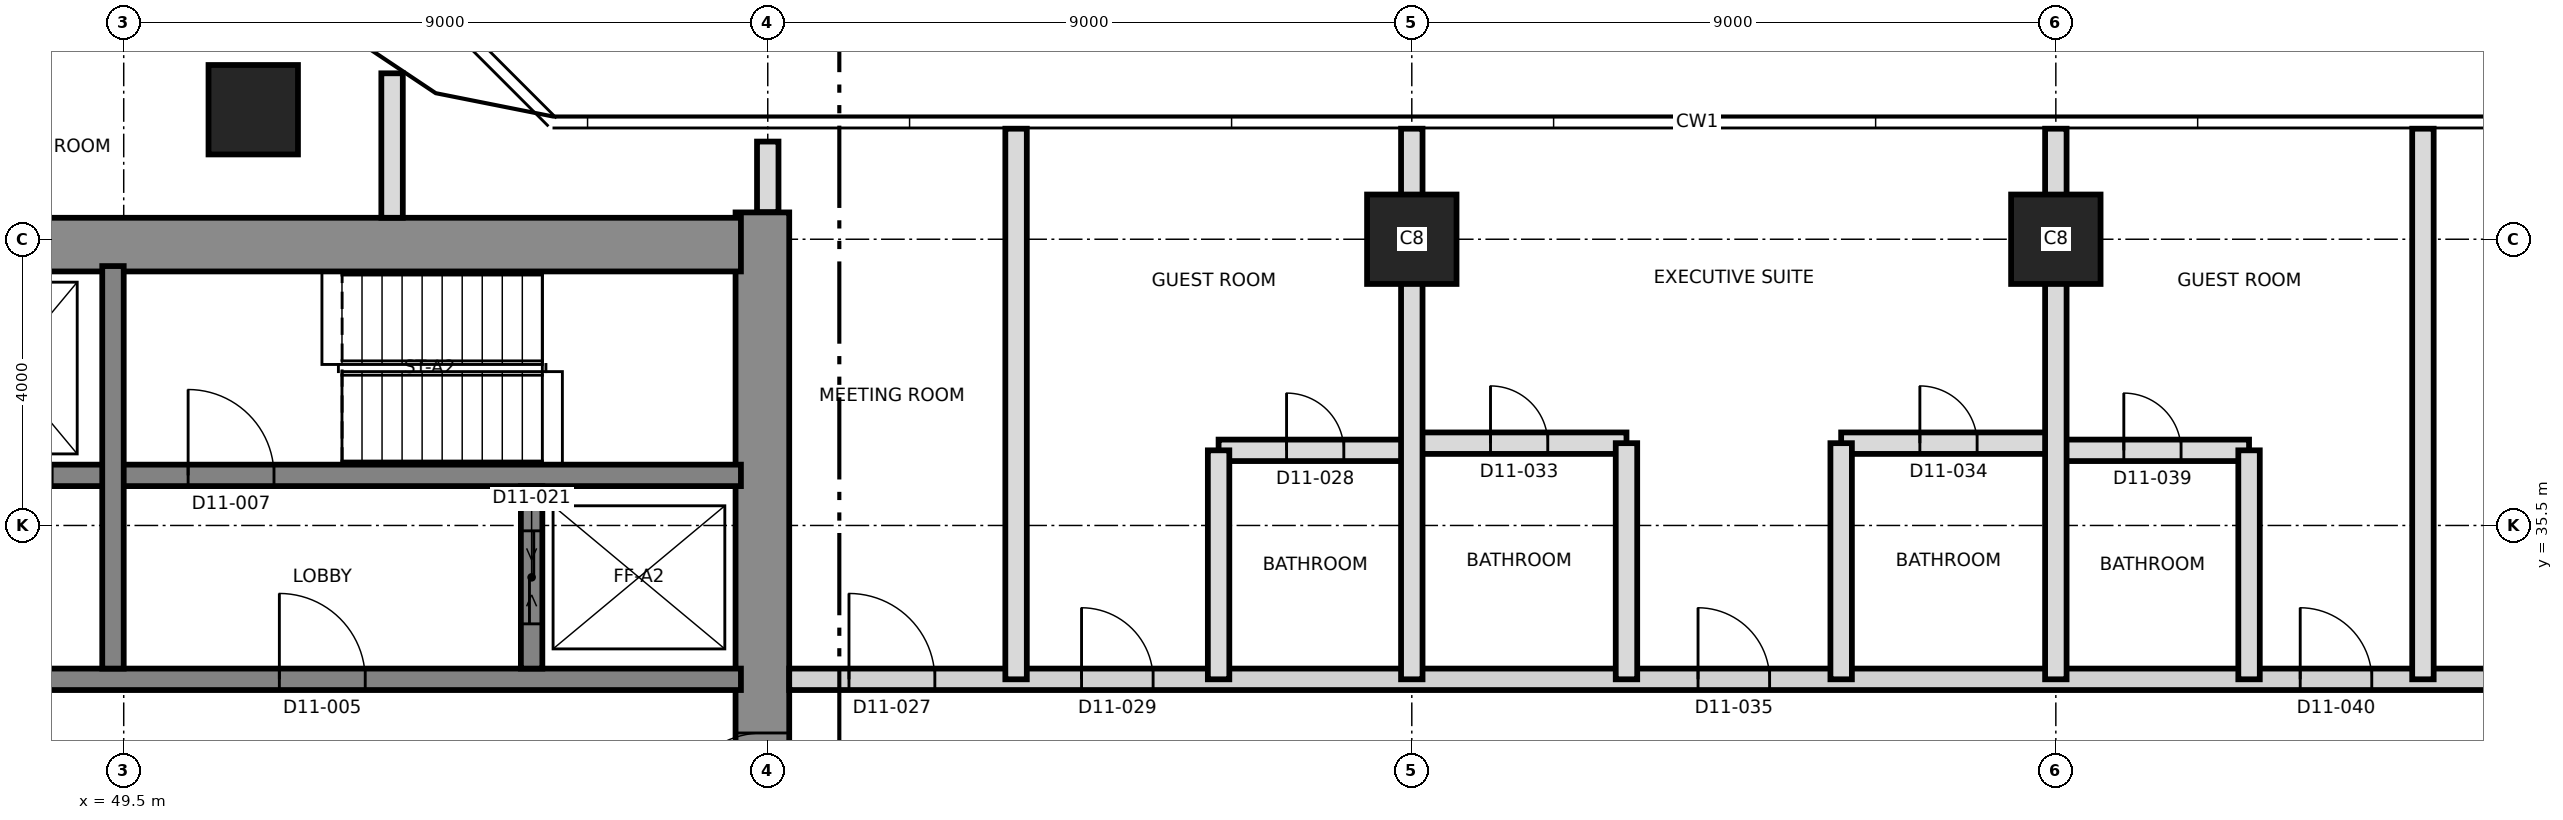
"""IFC4 building model, lengths in metres.
Left out: names, types, materials, properties, quantities, classifications, styles, units other than length and angle.
Written with IfcOpenShell. Run it as: python <this file> out.ifc"""

import sys

from ifc_helpers import new_model, si_unit, direction, frame, frame_2d, origin, origin_2d, place, context, subcontext, project, spatial, rectangle, extrude, element, fill, save


model = new_model("IFC4")
c1 = context("Model", 3, precision=1e-05, world=origin(), true_north=direction((0.0, 1.0)))
c2 = subcontext(c1, "Body", "Model", "MODEL_VIEW")
j1 = project(units=[si_unit("LENGTHUNIT", "METRE"), si_unit("PLANEANGLEUNIT", "RADIAN")], contexts=[c1])
p1 = place(None, origin())
s1 = spatial("IfcSite", under=j1, at=p1, CompositionType="ELEMENT")
p2 = place(p1, origin())
s2 = spatial("IfcBuilding", under=s1, at=p2, CompositionType="ELEMENT")
p3 = place(p2, frame((0.0, 0.0, 124.1)))
s3 = spatial("IfcBuildingStorey", under=s2, at=p3, CompositionType="ELEMENT", Elevation=124.1)
p4 = place(p3, frame((58.425, 21.125, 0.0), z_axis=(0.0, 0.0, 1.0), x_axis=(0.0, 1.0, 0.0)))
e1 = element("IfcWall", 1, at=p4, inside=s3, PredefinedType="SHEAR", context=c2, shape_type="SweptSolid", body=[
    extrude(rectangle(XDim=18.75, YDim=0.75, at=frame_2d((9.375, 0.0))), origin(), (0.0, 0.0, 1.0), 3.7),
])
p5 = place(p4, frame((10.275, 0.0, 0.0)))
e2 = element("IfcOpeningElement", 2, at=p5, cuts=e1, PredefinedType="OPENING", context=c2, shape_type="SweptSolid", body=[
    extrude(rectangle(XDim=1.2, YDim=2.1, at=frame_2d((0.6, 1.05))), frame((0.0, 0.385, 0.0), z_axis=(0.0, -1.0, 0.0), x_axis=(1.0, 0.0, 0.0)), (0.0, 0.0, 1.0), 0.77),
])
p6 = place(p3, frame((31.125, 39.425, 0.0), z_axis=(0.0, 0.0, 1.0), x_axis=(1.0, 0.0, 0.0)))
e3 = element("IfcWall", 3, at=p6, inside=s3, PredefinedType="SHEAR", context=c2, shape_type="SweptSolid", body=[
    extrude(rectangle(XDim=27.0, YDim=0.75, at=frame_2d((13.5, 0.0))), origin(), (0.0, 0.0, 1.0), 3.7),
])
p7 = place(p6, frame((10.575, 0.0, 0.0)))
e4 = element("IfcOpeningElement", 4, at=p7, cuts=e3, PredefinedType="OPENING", context=c2, shape_type="SweptSolid", body=[
    extrude(rectangle(XDim=1.2, YDim=2.1, at=frame_2d((0.6, 1.05))), frame((0.0, 0.385, 0.0), z_axis=(0.0, -1.0, 0.0), x_axis=(1.0, 0.0, 0.0)), (0.0, 0.0, 1.0), 0.77),
])
p8 = place(p3, frame((31.875, 33.35, 0.0), z_axis=(0.0, 0.0, 1.0), x_axis=(1.0, 0.0, 0.0)))
e5 = element("IfcWall", 5, at=p8, inside=s3, PredefinedType="SHEAR", context=c2, shape_type="SweptSolid", body=[
    extrude(rectangle(XDim=26.25, YDim=0.3, at=frame_2d((13.125, 0.0))), origin(), (0.0, 0.0, 1.0), 3.7),
])
p9 = place(p8, frame((13.2, 0.0, 0.0)))
e6 = element("IfcOpeningElement", 6, at=p9, cuts=e5, PredefinedType="OPENING", context=c2, shape_type="SweptSolid", body=[
    extrude(rectangle(XDim=1.4, YDim=2.1, at=frame_2d((0.7, 1.05))), frame((0.0, 0.16, 0.0), z_axis=(0.0, -1.0, 0.0), x_axis=(1.0, 0.0, 0.0)), (0.0, 0.0, 1.0), 0.32),
])
p10 = place(p8, frame((5.25, 0.0, 0.0)))
e7 = element("IfcOpeningElement", 7, at=p10, cuts=e5, PredefinedType="OPENING", context=c2, shape_type="SweptSolid", body=[
    extrude(rectangle(XDim=1.2, YDim=2.1, at=frame_2d((0.6, 1.05))), frame((0.0, 0.16, 0.0), z_axis=(0.0, -1.0, 0.0), x_axis=(1.0, 0.0, 0.0)), (0.0, 0.0, 1.0), 0.32),
])
p11 = place(p8, frame((19.8, 0.0, 0.0)))
e8 = element("IfcOpeningElement", 8, at=p11, cuts=e5, PredefinedType="OPENING", context=c2, shape_type="SweptSolid", body=[
    extrude(rectangle(XDim=1.2, YDim=2.1, at=frame_2d((0.6, 1.05))), frame((0.0, 0.16, 0.0), z_axis=(0.0, -1.0, 0.0), x_axis=(1.0, 0.0, 0.0)), (0.0, 0.0, 1.0), 0.32),
])
p12 = place(p3, frame((43.5, 36.2, 0.0), z_axis=(0.0, 0.0, 1.0), x_axis=(1.0, 0.0, 0.0)))
e9 = element("IfcWall", 9, at=p12, inside=s3, PredefinedType="SHEAR", context=c2, shape_type="SweptSolid", body=[
    extrude(rectangle(XDim=14.625, YDim=0.3, at=frame_2d((7.312, 0.0))), origin(), (0.0, 0.0, 1.0), 3.7),
])
p13 = place(p12, frame((6.9, 0.0, 0.0)))
e10 = element("IfcOpeningElement", 10, at=p13, cuts=e9, PredefinedType="OPENING", context=c2, shape_type="SweptSolid", body=[
    extrude(rectangle(XDim=1.2, YDim=2.1, at=frame_2d((0.6, 1.05))), frame((0.0, 0.16, 0.0), z_axis=(0.0, -1.0, 0.0), x_axis=(1.0, 0.0, 0.0)), (0.0, 0.0, 1.0), 0.32),
])
p14 = place(p12, frame((0.7, 0.0, 0.0)))
e11 = element("IfcOpeningElement", 11, at=p14, cuts=e9, PredefinedType="OPENING", context=c2, shape_type="SweptSolid", body=[
    extrude(rectangle(XDim=1.3, YDim=2.4, at=frame_2d((0.65, 1.2))), frame((0.0, 0.16, 0.0), z_axis=(0.0, -1.0, 0.0), x_axis=(1.0, 0.0, 0.0)), (0.0, 0.0, 1.0), 0.32),
])
p15 = place(p12, frame((3.7, 0.0, 0.0)))
e12 = element("IfcOpeningElement", 12, at=p15, cuts=e9, PredefinedType="OPENING", context=c2, shape_type="SweptSolid", body=[
    extrude(rectangle(XDim=1.3, YDim=2.4, at=frame_2d((0.65, 1.2))), frame((0.0, 0.16, 0.0), z_axis=(0.0, -1.0, 0.0), x_axis=(1.0, 0.0, 0.0)), (0.0, 0.0, 1.0), 0.32),
])
p16 = place(p3, frame((49.35, 33.5, 0.0), z_axis=(0.0, 0.0, 1.0), x_axis=(0.0, 1.0, 0.0)))
e13 = element("IfcWall", 13, at=p16, inside=s3, PredefinedType="SHEAR", context=c2, shape_type="SweptSolid", body=[
    extrude(rectangle(XDim=5.625, YDim=0.3, at=frame_2d((2.812, 0.0))), origin(), (0.0, 0.0, 1.0), 3.7),
])
p17 = place(p3, frame((55.2, 33.5, 0.0), z_axis=(0.0, 0.0, 1.0), x_axis=(0.0, 1.0, 0.0)))
e14 = element("IfcWall", 14, at=p17, inside=s3, PredefinedType="SHEAR", context=c2, shape_type="SweptSolid", body=[
    extrude(rectangle(XDim=2.55, YDim=0.3, at=frame_2d((1.275, 0.0))), origin(), (0.0, 0.0, 1.0), 3.7),
])
p18 = place(p17, frame((0.625, 0.0, 0.0)))
e15 = element("IfcOpeningElement", 15, at=p18, cuts=e14, PredefinedType="OPENING", context=c2, shape_type="SweptSolid", body=[
    extrude(rectangle(XDim=1.3, YDim=2.4, at=frame_2d((0.65, 1.2))), frame((0.0, 0.16, 0.0), z_axis=(0.0, -1.0, 0.0), x_axis=(1.0, 0.0, 0.0)), (0.0, 0.0, 1.0), 0.32),
])
for number, where, z_axis, x_axis in (
    (16, (67.5, 39.5, 0.0), (0.0, 0.0, 1.0), (1.0, 0.0, 0.0)),
    (17, (76.5, 39.5, 0.0), (0.0, 0.0, 1.0), (1.0, 0.0, 0.0)),
    (18, (51.31, 41.31, 0.0), (0.0, 0.0, 1.0), (1.0, 0.0, 0.0)),
):
    element("IfcColumn", number, at=place(p3, frame(where, z_axis=z_axis, x_axis=x_axis)), inside=s3, PredefinedType="COLUMN", context=c2, shape_type="SweptSolid", body=[
        extrude(rectangle(XDim=1.25, YDim=1.25, at=origin_2d()), origin(), (0.0, 0.0, 1.0), 3.7),
    ])
p19 = place(p3, frame((58.8, 33.35, 0.0), z_axis=(0.0, 0.0, 1.0), x_axis=(1.0, 0.0, 0.0)))
e19 = element("IfcWall", 19, at=p19, inside=s3, PredefinedType="PARTITIONING", context=c2, shape_type="SweptSolid", body=[
    extrude(rectangle(XDim=26.53, YDim=0.3, at=frame_2d((13.265, 0.0))), origin(), (0.0, 0.0, 1.0), 3.4),
])
p20 = place(p19, frame((0.835, 0.0, 0.0)))
e20 = element("IfcOpeningElement", 20, at=p20, cuts=e19, PredefinedType="OPENING", context=c2, shape_type="SweptSolid", body=[
    extrude(rectangle(XDim=1.2, YDim=2.1, at=frame_2d((0.6, 1.05))), frame((0.0, 0.16, 0.0), z_axis=(0.0, -1.0, 0.0), x_axis=(1.0, 0.0, 0.0)), (0.0, 0.0, 1.0), 0.32),
])
p21 = place(p19, frame((4.085, 0.0, 0.0)))
e21 = element("IfcOpeningElement", 21, at=p21, cuts=e19, PredefinedType="OPENING", context=c2, shape_type="SweptSolid", body=[
    extrude(rectangle(XDim=1.0, YDim=2.1, at=frame_2d((0.5, 1.05))), frame((0.0, 0.16, 0.0), z_axis=(0.0, -1.0, 0.0), x_axis=(1.0, 0.0, 0.0)), (0.0, 0.0, 1.0), 0.32),
])
p22 = place(p19, frame((12.7, 0.0, 0.0)))
e22 = element("IfcOpeningElement", 22, at=p22, cuts=e19, PredefinedType="OPENING", context=c2, shape_type="SweptSolid", body=[
    extrude(rectangle(XDim=1.0, YDim=2.4, at=frame_2d((0.5, 1.2))), frame((0.0, 0.16, 0.0), z_axis=(0.0, -1.0, 0.0), x_axis=(1.0, 0.0, 0.0)), (0.0, 0.0, 1.0), 0.32),
])
p23 = place(p19, frame((21.115, 0.0, 0.0)))
e23 = element("IfcOpeningElement", 23, at=p23, cuts=e19, PredefinedType="OPENING", context=c2, shape_type="SweptSolid", body=[
    extrude(rectangle(XDim=1.0, YDim=2.1, at=frame_2d((0.5, 1.05))), frame((0.0, 0.16, 0.0), z_axis=(0.0, -1.0, 0.0), x_axis=(1.0, 0.0, 0.0)), (0.0, 0.0, 1.0), 0.32),
])
p24 = place(p19, frame((24.065, 0.0, 0.0)))
e24 = element("IfcOpeningElement", 24, at=p24, cuts=e19, PredefinedType="OPENING", context=c2, shape_type="SweptSolid", body=[
    extrude(rectangle(XDim=1.4, YDim=2.1, at=frame_2d((0.7, 1.05))), frame((0.0, 0.16, 0.0), z_axis=(0.0, -1.0, 0.0), x_axis=(1.0, 0.0, 0.0)), (0.0, 0.0, 1.0), 0.32),
])
p25 = place(p3, frame((64.8, 36.55, 0.0), z_axis=(0.0, 0.0, 1.0), x_axis=(1.0, 0.0, 0.0)))
e25 = element("IfcWall", 25, at=p25, inside=s3, PredefinedType="PARTITIONING", context=c2, shape_type="SweptSolid", body=[
    extrude(rectangle(XDim=2.7, YDim=0.3, at=frame_2d((1.35, 0.0))), origin(), (0.0, 0.0, 1.0), 3.4),
])
p26 = place(p25, frame((0.95, 0.0, 0.0)))
e26 = element("IfcOpeningElement", 26, at=p26, cuts=e25, PredefinedType="OPENING", context=c2, shape_type="SweptSolid", body=[
    extrude(rectangle(XDim=0.8, YDim=2.1, at=frame_2d((0.4, 1.05))), frame((0.0, 0.16, 0.0), z_axis=(0.0, -1.0, 0.0), x_axis=(1.0, 0.0, 0.0)), (0.0, 0.0, 1.0), 0.32),
])
p27 = place(p3, frame((76.5, 36.55, 0.0), z_axis=(0.0, 0.0, 1.0), x_axis=(1.0, 0.0, 0.0)))
e27 = element("IfcWall", 27, at=p27, inside=s3, PredefinedType="PARTITIONING", context=c2, shape_type="SweptSolid", body=[
    extrude(rectangle(XDim=2.7, YDim=0.3, at=frame_2d((1.35, 0.0))), origin(), (0.0, 0.0, 1.0), 3.4),
])
p28 = place(p27, frame((0.95, 0.0, 0.0)))
e28 = element("IfcOpeningElement", 28, at=p28, cuts=e27, PredefinedType="OPENING", context=c2, shape_type="SweptSolid", body=[
    extrude(rectangle(XDim=0.8, YDim=2.1, at=frame_2d((0.4, 1.05))), frame((0.0, 0.16, 0.0), z_axis=(0.0, -1.0, 0.0), x_axis=(1.0, 0.0, 0.0)), (0.0, 0.0, 1.0), 0.32),
])
p29 = place(p3, frame((67.5, 36.65, 0.0), z_axis=(0.0, 0.0, 1.0), x_axis=(1.0, 0.0, 0.0)))
e29 = element("IfcWall", 29, at=p29, inside=s3, PredefinedType="PARTITIONING", context=c2, shape_type="SweptSolid", body=[
    extrude(rectangle(XDim=3.0, YDim=0.3, at=frame_2d((1.5, 0.0))), origin(), (0.0, 0.0, 1.0), 3.4),
])
p30 = place(p29, frame((1.1, 0.0, 0.0)))
e30 = element("IfcOpeningElement", 30, at=p30, cuts=e29, PredefinedType="OPENING", context=c2, shape_type="SweptSolid", body=[
    extrude(rectangle(XDim=0.8, YDim=2.1, at=frame_2d((0.4, 1.05))), frame((0.0, 0.16, 0.0), z_axis=(0.0, -1.0, 0.0), x_axis=(1.0, 0.0, 0.0)), (0.0, 0.0, 1.0), 0.32),
])
p31 = place(p3, frame((73.5, 36.65, 0.0), z_axis=(0.0, 0.0, 1.0), x_axis=(1.0, 0.0, 0.0)))
e31 = element("IfcWall", 31, at=p31, inside=s3, PredefinedType="PARTITIONING", context=c2, shape_type="SweptSolid", body=[
    extrude(rectangle(XDim=3.0, YDim=0.3, at=frame_2d((1.5, 0.0))), origin(), (0.0, 0.0, 1.0), 3.4),
])
p32 = place(p31, frame((1.1, 0.0, 0.0)))
e32 = element("IfcOpeningElement", 32, at=p32, cuts=e31, PredefinedType="OPENING", context=c2, shape_type="SweptSolid", body=[
    extrude(rectangle(XDim=0.8, YDim=2.1, at=frame_2d((0.4, 1.05))), frame((0.0, 0.16, 0.0), z_axis=(0.0, -1.0, 0.0), x_axis=(1.0, 0.0, 0.0)), (0.0, 0.0, 1.0), 0.32),
])
p33 = place(p3, frame((53.25, 39.8, 0.0), z_axis=(0.0, 0.0, 1.0), x_axis=(0.0, 1.0, 0.0)))
e33 = element("IfcWall", 33, at=p33, inside=s3, PredefinedType="PARTITIONING", context=c2, shape_type="SweptSolid", body=[
    extrude(rectangle(XDim=2.019, YDim=0.3, at=frame_2d((1.01, 0.0))), origin(), (0.0, 0.0, 1.0), 3.4),
])
p34 = place(p3, frame((58.5, 39.88, 0.0), z_axis=(0.0, 0.0, 1.0), x_axis=(0.0, 1.0, 0.0)))
e34 = element("IfcWall", 34, at=p34, inside=s3, PredefinedType="PARTITIONING", context=c2, shape_type="SweptSolid", body=[
    extrude(rectangle(XDim=0.985, YDim=0.3, at=frame_2d((0.493, 0.0))), origin(), (0.0, 0.0, 1.0), 3.4),
])
p35 = place(p3, frame((61.97, 33.35, 0.0), z_axis=(0.0, 0.0, 1.0), x_axis=(0.0, 1.0, 0.0)))
e35 = element("IfcWall", 35, at=p35, inside=s3, PredefinedType="PARTITIONING", context=c2, shape_type="SweptSolid", body=[
    extrude(rectangle(XDim=7.695, YDim=0.3, at=frame_2d((3.847, 0.0))), origin(), (0.0, 0.0, 1.0), 3.4),
])
p36 = place(p3, frame((64.8, 33.35, 0.0), z_axis=(0.0, 0.0, 1.0), x_axis=(0.0, 1.0, 0.0)))
e36 = element("IfcWall", 36, at=p36, inside=s3, PredefinedType="PARTITIONING", context=c2, shape_type="SweptSolid", body=[
    extrude(rectangle(XDim=3.2, YDim=0.3, at=frame_2d((1.6, 0.0))), origin(), (0.0, 0.0, 1.0), 3.4),
])
p37 = place(p3, frame((67.5, 33.35, 0.0), z_axis=(0.0, 0.0, 1.0), x_axis=(0.0, 1.0, 0.0)))
e37 = element("IfcWall", 37, at=p37, inside=s3, PredefinedType="PARTITIONING", context=c2, shape_type="SweptSolid", body=[
    extrude(rectangle(XDim=7.695, YDim=0.3, at=frame_2d((3.847, 0.0))), origin(), (0.0, 0.0, 1.0), 3.4),
])
for number, where, z_axis, x_axis in (
    (38, (70.5, 33.35, 0.0), (0.0, 0.0, 1.0), (0.0, 1.0, 0.0)),
    (39, (73.5, 33.35, 0.0), (0.0, 0.0, 1.0), (0.0, 1.0, 0.0)),
):
    element("IfcWall", number, at=place(p3, frame(where, z_axis=z_axis, x_axis=x_axis)), inside=s3, PredefinedType="PARTITIONING", context=c2, shape_type="SweptSolid", body=[
        extrude(rectangle(XDim=3.3, YDim=0.3, at=frame_2d((1.65, 0.0))), origin(), (0.0, 0.0, 1.0), 3.4),
    ])
p38 = place(p3, frame((76.5, 33.35, 0.0), z_axis=(0.0, 0.0, 1.0), x_axis=(0.0, 1.0, 0.0)))
e40 = element("IfcWall", 40, at=p38, inside=s3, PredefinedType="PARTITIONING", context=c2, shape_type="SweptSolid", body=[
    extrude(rectangle(XDim=7.695, YDim=0.3, at=frame_2d((3.847, 0.0))), origin(), (0.0, 0.0, 1.0), 3.4),
])
p39 = place(p3, frame((79.2, 33.35, 0.0), z_axis=(0.0, 0.0, 1.0), x_axis=(0.0, 1.0, 0.0)))
e41 = element("IfcWall", 41, at=p39, inside=s3, PredefinedType="PARTITIONING", context=c2, shape_type="SweptSolid", body=[
    extrude(rectangle(XDim=3.2, YDim=0.3, at=frame_2d((1.6, 0.0))), origin(), (0.0, 0.0, 1.0), 3.4),
])
p40 = place(p3, frame((81.63, 33.35, 0.0), z_axis=(0.0, 0.0, 1.0), x_axis=(0.0, 1.0, 0.0)))
e42 = element("IfcWall", 42, at=p40, inside=s3, PredefinedType="PARTITIONING", context=c2, shape_type="SweptSolid", body=[
    extrude(rectangle(XDim=7.695, YDim=0.3, at=frame_2d((3.847, 0.0))), origin(), (0.0, 0.0, 1.0), 3.4),
])
p41 = place(p11, origin())
e43 = element("IfcDoor", 43, at=p41, inside=s3, OperationType="SINGLE_SWING_RIGHT", PredefinedType="DOOR", context=c2, shape_type="SweptSolid", body=[
    extrude(rectangle(XDim=1.2, YDim=2.1, at=frame_2d((0.6, 1.05))), frame((0.0, 0.025, 0.0), z_axis=(0.0, -1.0, 0.0), x_axis=(1.0, 0.0, 0.0)), (0.0, 0.0, 1.0), 0.05),
])
fill(e8, e43)
p42 = place(p13, origin())
e44 = element("IfcDoor", 44, at=p42, inside=s3, OperationType="SINGLE_SWING_LEFT", PredefinedType="DOOR", context=c2, shape_type="SweptSolid", body=[
    extrude(rectangle(XDim=1.2, YDim=2.1, at=frame_2d((0.6, 1.05))), frame((0.0, 0.025, 0.0), z_axis=(0.0, -1.0, 0.0), x_axis=(1.0, 0.0, 0.0)), (0.0, 0.0, 1.0), 0.05),
])
fill(e10, e44)
p43 = place(p5, origin())
e45 = element("IfcDoor", 45, at=p43, inside=s3, OperationType="SINGLE_SWING_LEFT", PredefinedType="DOOR", context=c2, shape_type="SweptSolid", body=[
    extrude(rectangle(XDim=1.2, YDim=2.1, at=frame_2d((0.6, 1.05))), frame((0.0, 0.025, 0.0), z_axis=(0.0, -1.0, 0.0), x_axis=(1.0, 0.0, 0.0)), (0.0, 0.0, 1.0), 0.05),
])
fill(e2, e45)
p44 = place(p18, origin())
e46 = element("IfcDoor", 46, at=p44, inside=s3, OperationType="SLIDING_TO_LEFT", PredefinedType="DOOR", context=c2, shape_type="SweptSolid", body=[
    extrude(rectangle(XDim=1.3, YDim=2.4, at=frame_2d((0.65, 1.2))), frame((0.0, 0.025, 0.0), z_axis=(0.0, -1.0, 0.0), x_axis=(1.0, 0.0, 0.0)), (0.0, 0.0, 1.0), 0.05),
])
fill(e15, e46)
p45 = place(p20, origin())
e47 = element("IfcDoor", 47, at=p45, inside=s3, OperationType="SINGLE_SWING_LEFT", PredefinedType="DOOR", context=c2, shape_type="SweptSolid", body=[
    extrude(rectangle(XDim=1.2, YDim=2.1, at=frame_2d((0.6, 1.05))), frame((0.0, 0.025, 0.0), z_axis=(0.0, -1.0, 0.0), x_axis=(1.0, 0.0, 0.0)), (0.0, 0.0, 1.0), 0.05),
])
fill(e20, e47)
p46 = place(p26, origin())
e48 = element("IfcDoor", 48, at=p46, inside=s3, OperationType="SINGLE_SWING_RIGHT", PredefinedType="DOOR", context=c2, shape_type="SweptSolid", body=[
    extrude(rectangle(XDim=0.8, YDim=2.1, at=frame_2d((0.4, 1.05))), frame((0.0, 0.025, 0.0), z_axis=(0.0, -1.0, 0.0), x_axis=(1.0, 0.0, 0.0)), (0.0, 0.0, 1.0), 0.05),
])
fill(e26, e48)
p47 = place(p21, origin())
e49 = element("IfcDoor", 49, at=p47, inside=s3, OperationType="SINGLE_SWING_LEFT", PredefinedType="DOOR", context=c2, shape_type="SweptSolid", body=[
    extrude(rectangle(XDim=1.0, YDim=2.1, at=frame_2d((0.5, 1.05))), frame((0.0, 0.025, 0.0), z_axis=(0.0, -1.0, 0.0), x_axis=(1.0, 0.0, 0.0)), (0.0, 0.0, 1.0), 0.05),
])
fill(e21, e49)
p48 = place(p30, origin())
e50 = element("IfcDoor", 50, at=p48, inside=s3, OperationType="SINGLE_SWING_LEFT", PredefinedType="DOOR", context=c2, shape_type="SweptSolid", body=[
    extrude(rectangle(XDim=0.8, YDim=2.1, at=frame_2d((0.4, 1.05))), frame((0.0, 0.025, 0.0), z_axis=(0.0, -1.0, 0.0), x_axis=(1.0, 0.0, 0.0)), (0.0, 0.0, 1.0), 0.05),
])
fill(e30, e50)
p49 = place(p32, origin())
e51 = element("IfcDoor", 51, at=p49, inside=s3, OperationType="SINGLE_SWING_RIGHT", PredefinedType="DOOR", context=c2, shape_type="SweptSolid", body=[
    extrude(rectangle(XDim=0.8, YDim=2.1, at=frame_2d((0.4, 1.05))), frame((0.0, 0.025, 0.0), z_axis=(0.0, -1.0, 0.0), x_axis=(1.0, 0.0, 0.0)), (0.0, 0.0, 1.0), 0.05),
])
fill(e32, e51)
p50 = place(p22, origin())
e52 = element("IfcDoor", 52, at=p50, inside=s3, OperationType="SINGLE_SWING_LEFT", PredefinedType="DOOR", context=c2, shape_type="SweptSolid", body=[
    extrude(rectangle(XDim=1.0, YDim=2.4, at=frame_2d((0.5, 1.2))), frame((0.0, 0.025, 0.0), z_axis=(0.0, -1.0, 0.0), x_axis=(1.0, 0.0, 0.0)), (0.0, 0.0, 1.0), 0.05),
])
fill(e22, e52)
p51 = place(p28, origin())
e53 = element("IfcDoor", 53, at=p51, inside=s3, OperationType="SINGLE_SWING_LEFT", PredefinedType="DOOR", context=c2, shape_type="SweptSolid", body=[
    extrude(rectangle(XDim=0.8, YDim=2.1, at=frame_2d((0.4, 1.05))), frame((0.0, 0.025, 0.0), z_axis=(0.0, -1.0, 0.0), x_axis=(1.0, 0.0, 0.0)), (0.0, 0.0, 1.0), 0.05),
])
fill(e28, e53)
p52 = place(p23, origin())
e54 = element("IfcDoor", 54, at=p52, inside=s3, OperationType="SINGLE_SWING_LEFT", PredefinedType="DOOR", context=c2, shape_type="SweptSolid", body=[
    extrude(rectangle(XDim=1.0, YDim=2.1, at=frame_2d((0.5, 1.05))), frame((0.0, 0.025, 0.0), z_axis=(0.0, -1.0, 0.0), x_axis=(1.0, 0.0, 0.0)), (0.0, 0.0, 1.0), 0.05),
])
fill(e23, e54)
save(model, sys.argv[1])
